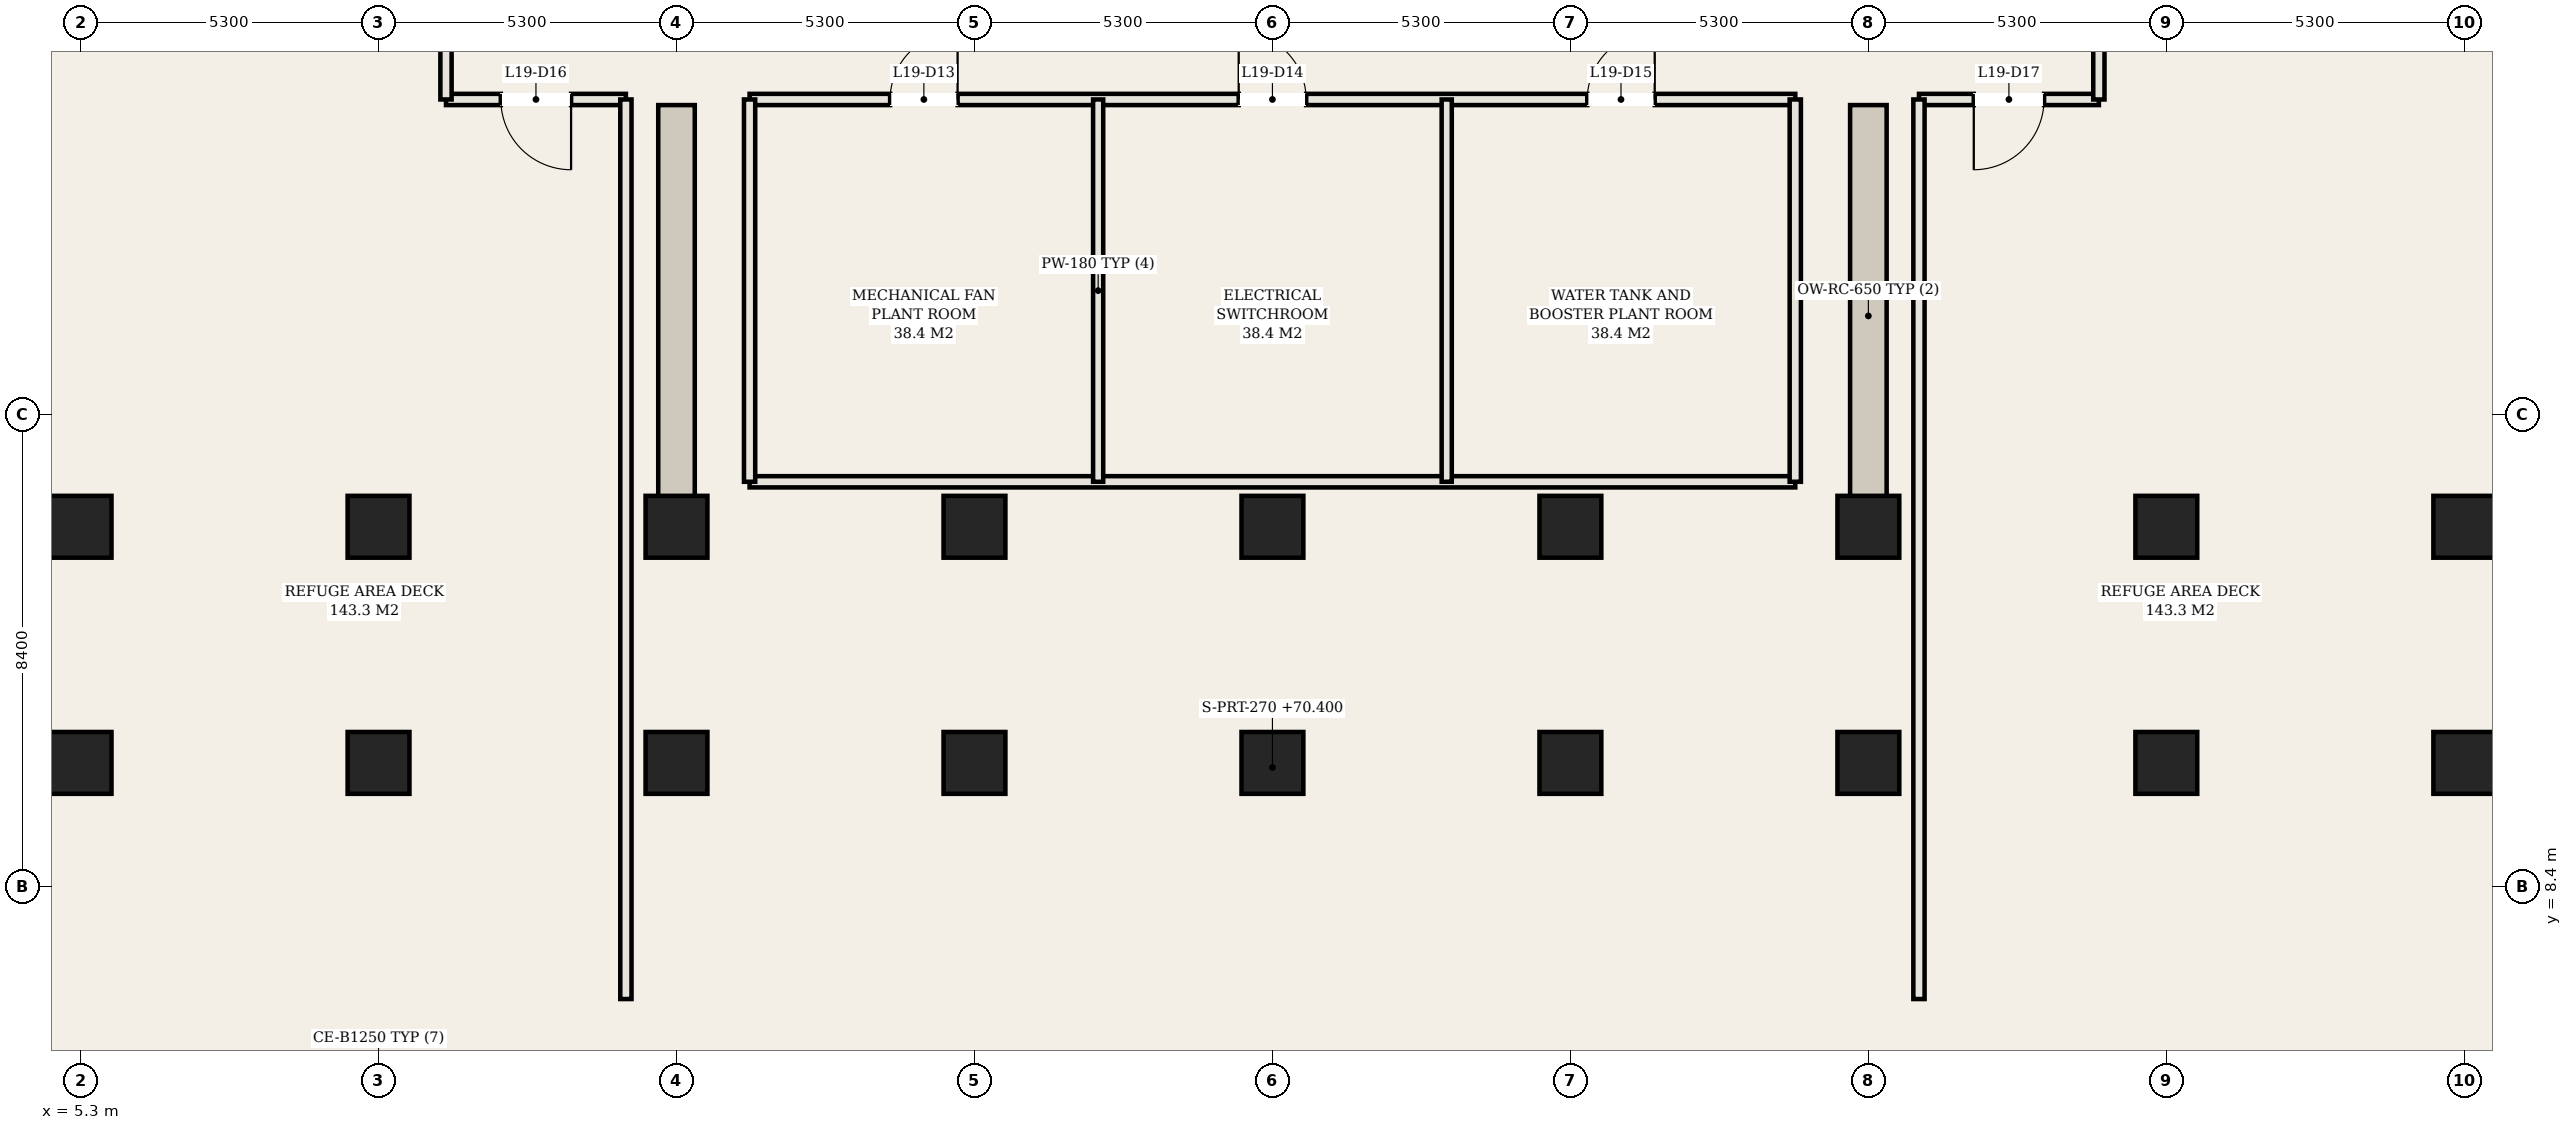
"""IFC4 building model, lengths in metres.
Left out: names, types, materials, properties, quantities, classifications, styles, units other than length and angle.
Written with IfcOpenShell. Run it as: python <this file> out.ifc"""

import sys

from ifc_helpers import new_model, si_unit, direction, frame, frame_2d, origin, origin_2d, place, context, subcontext, project, spatial, rectangle, hollow_rectangle, extrude, element, fill, save


model = new_model("IFC4")
c1 = context("Model", 3, precision=1e-05, world=origin(), true_north=direction((0.0, 1.0)))
c2 = subcontext(c1, "Body", "Model", "MODEL_VIEW")
j1 = project(units=[si_unit("LENGTHUNIT", "METRE"), si_unit("PLANEANGLEUNIT", "RADIAN")], contexts=[c1])
p1 = place(None, origin())
s1 = spatial("IfcSite", under=j1, at=p1, CompositionType="ELEMENT")
p2 = place(p1, origin())
s2 = spatial("IfcBuilding", under=s1, at=p2, CompositionType="ELEMENT")
p3 = place(p2, frame((0.0, 0.0, 70.4)))
s3 = spatial("IfcBuildingStorey", under=s2, at=p3, CompositionType="ELEMENT", Elevation=70.4)
for number, where, z_axis, x_axis in (
    (1, (15.9, 14.8, 0.0), (0.0, 0.0, 1.0), (0.0, 1.0, 0.0)),
    (2, (37.1, 14.8, 0.0), (0.0, 0.0, 1.0), (0.0, 1.0, 0.0)),
):
    element("IfcWall", number, at=place(p3, frame(where, z_axis=z_axis, x_axis=x_axis)), inside=s3, PredefinedType="SHEAR", context=c2, shape_type="SweptSolid", body=[
        extrude(rectangle(XDim=7.5, YDim=0.65, at=frame_2d((3.75, 0.0))), origin(), (0.0, 0.0, 1.0), 6.56),
    ])
for number, where, z_axis, x_axis in (
    (3, (10.6, 14.8, 0.0), (0.0, 0.0, 1.0), (1.0, 0.0, 0.0)),
    (4, (10.6, 10.6, 0.0), (0.0, 0.0, 1.0), (1.0, 0.0, 0.0)),
    (5, (15.9, 14.8, 0.0), (0.0, 0.0, 1.0), (1.0, 0.0, 0.0)),
    (6, (15.9, 10.6, 0.0), (0.0, 0.0, 1.0), (1.0, 0.0, 0.0)),
    (7, (21.2, 14.8, 0.0), (0.0, 0.0, 1.0), (1.0, 0.0, 0.0)),
    (8, (21.2, 10.6, 0.0), (0.0, 0.0, 1.0), (1.0, 0.0, 0.0)),
    (9, (26.5, 14.8, 0.0), (0.0, 0.0, 1.0), (1.0, 0.0, 0.0)),
    (10, (26.5, 10.6, 0.0), (0.0, 0.0, 1.0), (1.0, 0.0, 0.0)),
    (11, (31.8, 14.8, 0.0), (0.0, 0.0, 1.0), (1.0, 0.0, 0.0)),
    (12, (31.8, 10.6, 0.0), (0.0, 0.0, 1.0), (1.0, 0.0, 0.0)),
    (13, (37.1, 14.8, 0.0), (0.0, 0.0, 1.0), (1.0, 0.0, 0.0)),
    (14, (37.1, 10.6, 0.0), (0.0, 0.0, 1.0), (1.0, 0.0, 0.0)),
    (15, (42.4, 14.8, 0.0), (0.0, 0.0, 1.0), (1.0, 0.0, 0.0)),
    (16, (42.4, 10.6, 0.0), (0.0, 0.0, 1.0), (1.0, 0.0, 0.0)),
    (17, (5.3, 10.6, 0.0), (0.0, 0.0, 1.0), (1.0, 0.0, 0.0)),
    (18, (5.3, 14.8, 0.0), (0.0, 0.0, 1.0), (1.0, 0.0, 0.0)),
    (19, (47.7, 10.6, 0.0), (0.0, 0.0, 1.0), (1.0, 0.0, 0.0)),
    (20, (47.7, 14.8, 0.0), (0.0, 0.0, 1.0), (1.0, 0.0, 0.0)),
):
    element("IfcColumn", number, at=place(p3, frame(where, z_axis=z_axis, x_axis=x_axis)), inside=s3, PredefinedType="COLUMN", context=c2, shape_type="SweptSolid", body=[
        extrude(hollow_rectangle(XDim=1.1, YDim=1.1, WallThickness=0.036, at=origin_2d()), origin(), (0.0, 0.0, 1.0), 6.8),
    ])
p4 = place(p3, frame((17.2, 22.4, 0.0), z_axis=(0.0, 0.0, 1.0), x_axis=(1.0, 0.0, 0.0)))
e21 = element("IfcWall", 21, at=p4, inside=s3, PredefinedType="PARTITIONING", context=c2, shape_type="SweptSolid", body=[
    extrude(rectangle(XDim=18.6, YDim=0.2, at=frame_2d((9.3, 0.0))), origin(), (0.0, 0.0, 1.0), 6.56),
])
p5 = place(p4, frame((2.5, 0.0, 0.0)))
e22 = element("IfcOpeningElement", 22, at=p5, cuts=e21, PredefinedType="OPENING", context=c2, shape_type="SweptSolid", body=[
    extrude(rectangle(XDim=1.2, YDim=2.2, at=frame_2d((0.6, 1.1))), frame((0.0, 0.11, 0.0), z_axis=(0.0, -1.0, 0.0), x_axis=(1.0, 0.0, 0.0)), (0.0, 0.0, 1.0), 0.22),
])
p6 = place(p4, frame((8.7, 0.0, 0.0)))
e23 = element("IfcOpeningElement", 23, at=p6, cuts=e21, PredefinedType="OPENING", context=c2, shape_type="SweptSolid", body=[
    extrude(rectangle(XDim=1.2, YDim=2.2, at=frame_2d((0.6, 1.1))), frame((0.0, 0.11, 0.0), z_axis=(0.0, -1.0, 0.0), x_axis=(1.0, 0.0, 0.0)), (0.0, 0.0, 1.0), 0.22),
])
p7 = place(p4, frame((14.9, 0.0, 0.0)))
e24 = element("IfcOpeningElement", 24, at=p7, cuts=e21, PredefinedType="OPENING", context=c2, shape_type="SweptSolid", body=[
    extrude(rectangle(XDim=1.2, YDim=2.2, at=frame_2d((0.6, 1.1))), frame((0.0, 0.11, 0.0), z_axis=(0.0, -1.0, 0.0), x_axis=(1.0, 0.0, 0.0)), (0.0, 0.0, 1.0), 0.22),
])
p8 = place(p3, frame((17.2, 15.6, 0.0), z_axis=(0.0, 0.0, 1.0), x_axis=(1.0, 0.0, 0.0)))
e25 = element("IfcWall", 25, at=p8, inside=s3, PredefinedType="PARTITIONING", context=c2, shape_type="SweptSolid", body=[
    extrude(rectangle(XDim=18.6, YDim=0.2, at=frame_2d((9.3, 0.0))), origin(), (0.0, 0.0, 1.0), 6.56),
])
for number, where, z_axis, x_axis in (
    (26, (17.2, 15.6, 0.0), (0.0, 0.0, 1.0), (0.0, 1.0, 0.0)),
    (27, (35.8, 15.6, 0.0), (0.0, 0.0, 1.0), (0.0, 1.0, 0.0)),
):
    element("IfcWall", number, at=place(p3, frame(where, z_axis=z_axis, x_axis=x_axis)), inside=s3, PredefinedType="PARTITIONING", context=c2, shape_type="SweptSolid", body=[
        extrude(rectangle(XDim=6.8, YDim=0.2, at=frame_2d((3.4, 0.0))), origin(), (0.0, 0.0, 1.0), 6.56),
    ])
for number, where, z_axis, x_axis in (
    (28, (23.4, 15.6, 0.0), (0.0, 0.0, 1.0), (0.0, 1.0, 0.0)),
    (29, (29.6, 15.6, 0.0), (0.0, 0.0, 1.0), (0.0, 1.0, 0.0)),
):
    element("IfcWall", number, at=place(p3, frame(where, z_axis=z_axis, x_axis=x_axis)), inside=s3, PredefinedType="PARTITIONING", context=c2, shape_type="SweptSolid", body=[
        extrude(rectangle(XDim=6.8, YDim=0.18, at=frame_2d((3.4, 0.0))), origin(), (0.0, 0.0, 1.0), 6.56),
    ])
p9 = place(p3, frame((11.8, 22.4, 0.0), z_axis=(0.0, 0.0, 1.0), x_axis=(1.0, 0.0, 0.0)))
e30 = element("IfcWall", 30, at=p9, inside=s3, PredefinedType="PARTITIONING", context=c2, shape_type="SweptSolid", body=[
    extrude(rectangle(XDim=3.2, YDim=0.2, at=frame_2d((1.6, 0.0))), origin(), (0.0, 0.0, 1.0), 6.56),
])
p10 = place(p9, frame((0.975, 0.0, 0.0)))
e31 = element("IfcOpeningElement", 31, at=p10, cuts=e30, PredefinedType="OPENING", context=c2, shape_type="SweptSolid", body=[
    extrude(rectangle(XDim=1.25, YDim=2.2, at=frame_2d((0.625, 1.1))), frame((0.0, 0.11, 0.0), z_axis=(0.0, -1.0, 0.0), x_axis=(1.0, 0.0, 0.0)), (0.0, 0.0, 1.0), 0.22),
])
p11 = place(p3, frame((38.0, 22.4, 0.0), z_axis=(0.0, 0.0, 1.0), x_axis=(1.0, 0.0, 0.0)))
e32 = element("IfcWall", 32, at=p11, inside=s3, PredefinedType="PARTITIONING", context=c2, shape_type="SweptSolid", body=[
    extrude(rectangle(XDim=3.2, YDim=0.2, at=frame_2d((1.6, 0.0))), origin(), (0.0, 0.0, 1.0), 6.56),
])
p12 = place(p11, frame((0.975, 0.0, 0.0)))
e33 = element("IfcOpeningElement", 33, at=p12, cuts=e32, PredefinedType="OPENING", context=c2, shape_type="SweptSolid", body=[
    extrude(rectangle(XDim=1.25, YDim=2.2, at=frame_2d((0.625, 1.1))), frame((0.0, 0.11, 0.0), z_axis=(0.0, -1.0, 0.0), x_axis=(1.0, 0.0, 0.0)), (0.0, 0.0, 1.0), 0.22),
])
for number, where, z_axis, x_axis in (
    (34, (11.8, 22.4, 0.0), (0.0, 0.0, 1.0), (0.0, 1.0, 0.0)),
    (35, (41.2, 22.4, 0.0), (0.0, 0.0, 1.0), (0.0, 1.0, 0.0)),
):
    element("IfcWall", number, at=place(p3, frame(where, z_axis=z_axis, x_axis=x_axis)), inside=s3, PredefinedType="PARTITIONING", context=c2, shape_type="SweptSolid", body=[
        extrude(rectangle(XDim=2.75, YDim=0.2, at=frame_2d((1.375, 0.0))), origin(), (0.0, 0.0, 1.0), 6.56),
    ])
for number, where, z_axis, x_axis in (
    (36, (15.0, 6.4, 0.0), (0.0, 0.0, 1.0), (0.0, 1.0, 0.0)),
    (37, (38.0, 6.4, 0.0), (0.0, 0.0, 1.0), (0.0, 1.0, 0.0)),
):
    element("IfcWall", number, at=place(p3, frame(where, z_axis=z_axis, x_axis=x_axis)), inside=s3, PredefinedType="PARTITIONING", context=c2, shape_type="SweptSolid", body=[
        extrude(rectangle(XDim=16.0, YDim=0.2, at=frame_2d((8.0, 0.0))), origin(), (0.0, 0.0, 1.0), 6.56),
    ])
p13 = place(p5, origin())
e38 = element("IfcDoor", 38, at=p13, inside=s3, OperationType="SINGLE_SWING_RIGHT", PredefinedType="DOOR", context=c2, shape_type="SweptSolid", body=[
    extrude(rectangle(XDim=1.2, YDim=2.2, at=frame_2d((0.6, 1.1))), frame((0.0, 0.025, 0.0), z_axis=(0.0, -1.0, 0.0), x_axis=(1.0, 0.0, 0.0)), (0.0, 0.0, 1.0), 0.05),
])
fill(e22, e38)
p14 = place(p6, origin())
e39 = element("IfcDoor", 39, at=p14, inside=s3, OperationType="SINGLE_SWING_LEFT", PredefinedType="DOOR", context=c2, shape_type="SweptSolid", body=[
    extrude(rectangle(XDim=1.2, YDim=2.2, at=frame_2d((0.6, 1.1))), frame((0.0, 0.025, 0.0), z_axis=(0.0, -1.0, 0.0), x_axis=(1.0, 0.0, 0.0)), (0.0, 0.0, 1.0), 0.05),
])
fill(e23, e39)
p15 = place(p7, origin())
e40 = element("IfcDoor", 40, at=p15, inside=s3, OperationType="SINGLE_SWING_RIGHT", PredefinedType="DOOR", context=c2, shape_type="SweptSolid", body=[
    extrude(rectangle(XDim=1.2, YDim=2.2, at=frame_2d((0.6, 1.1))), frame((0.0, 0.025, 0.0), z_axis=(0.0, -1.0, 0.0), x_axis=(1.0, 0.0, 0.0)), (0.0, 0.0, 1.0), 0.05),
])
fill(e24, e40)
p16 = place(p10, frame((1.25, 0.0, 0.0), z_axis=(0.0, 0.0, 1.0), x_axis=(-1.0, 0.0, 0.0)))
e41 = element("IfcDoor", 41, at=p16, inside=s3, OperationType="SINGLE_SWING_LEFT", PredefinedType="DOOR", context=c2, shape_type="SweptSolid", body=[
    extrude(rectangle(XDim=1.25, YDim=2.2, at=frame_2d((0.625, 1.1))), frame((0.0, 0.025, 0.0), z_axis=(0.0, -1.0, 0.0), x_axis=(1.0, 0.0, 0.0)), (0.0, 0.0, 1.0), 0.05),
])
fill(e31, e41)
p17 = place(p12, frame((1.25, 0.0, 0.0), z_axis=(0.0, 0.0, 1.0), x_axis=(-1.0, 0.0, 0.0)))
e42 = element("IfcDoor", 42, at=p17, inside=s3, OperationType="SINGLE_SWING_RIGHT", PredefinedType="DOOR", context=c2, shape_type="SweptSolid", body=[
    extrude(rectangle(XDim=1.25, YDim=2.2, at=frame_2d((0.625, 1.1))), frame((0.0, 0.025, 0.0), z_axis=(0.0, -1.0, 0.0), x_axis=(1.0, 0.0, 0.0)), (0.0, 0.0, 1.0), 0.05),
])
fill(e33, e42)
save(model, sys.argv[1])
